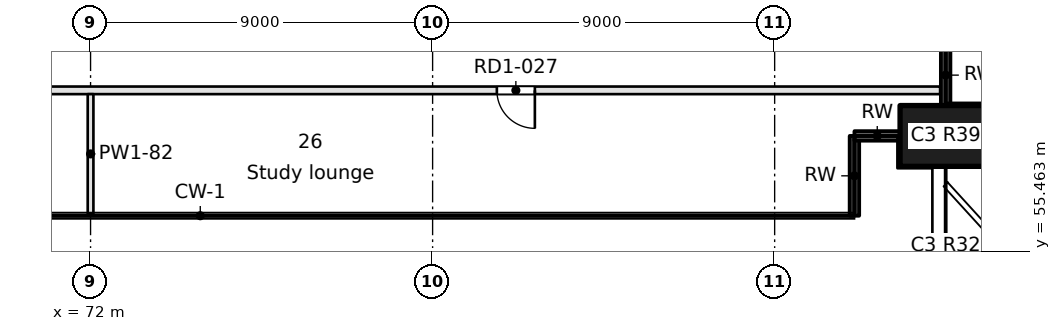
"""IFC4 building model, lengths in metres.
Left out: names, types, materials, properties, quantities, classifications, styles, units other than length and angle.
Written with IfcOpenShell. Run it as: python <this file> out.ifc"""

import sys

from ifc_helpers import new_model, si_unit, direction, frame, frame_2d, origin, origin_2d, place, context, subcontext, project, spatial, rectangle, extrude, element, fill, save


model = new_model("IFC4")
c1 = context("Model", 3, precision=1e-05, world=origin(), true_north=direction((0.0, 1.0)))
c2 = subcontext(c1, "Body", "Model", "MODEL_VIEW")
j1 = project(units=[si_unit("LENGTHUNIT", "METRE"), si_unit("PLANEANGLEUNIT", "RADIAN")], contexts=[c1])
p1 = place(None, origin())
s1 = spatial("IfcSite", under=j1, at=p1, CompositionType="ELEMENT")
p2 = place(p1, origin())
s2 = spatial("IfcBuilding", under=s1, at=p2, CompositionType="ELEMENT")
p3 = place(p2, frame((0.0, 0.0, 46.9)))
s3 = spatial("IfcBuildingStorey", under=s2, at=p3, CompositionType="ELEMENT", Elevation=46.9)
p4 = place(p3, frame((94.5, 58.5, 0.0), z_axis=(0.0, 0.0, 1.0), x_axis=(1.0, 0.0, 0.0)))
e1 = element("IfcColumn", 1, at=p4, inside=s3, PredefinedType="COLUMN", context=c2, shape_type="SweptSolid", body=[
    extrude(rectangle(XDim=2.4, YDim=1.6, at=origin_2d()), origin(), (0.0, 0.0, 1.0), 3.7),
])
p5 = place(p3, frame((92.099, 56.401, 0.0), z_axis=(0.0, 0.0, 1.0), x_axis=(0.00011626555, 0.999999993241, 0.0)))
e2 = element("IfcWall", 2, at=p5, inside=s3, PredefinedType="SOLIDWALL", context=c2, shape_type="SweptSolid", body=[
    extrude(rectangle(XDim=2.1, YDim=0.25, at=frame_2d((1.05, 0.0))), origin(), (0.0, 0.0, 1.0), 3.3),
])
p6 = place(p3, frame((92.099, 58.501, 0.0), z_axis=(0.0, 0.0, 1.0), x_axis=(1.0, 0.0, 0.0)))
e3 = element("IfcWall", 3, at=p6, inside=s3, PredefinedType="SOLIDWALL", context=c2, shape_type="SweptSolid", body=[
    extrude(rectangle(XDim=1.201, YDim=0.25, at=frame_2d((0.6, 0.0))), origin(), (0.0, 0.0, 1.0), 3.3),
])
p7 = place(p3, frame((94.499, 59.3, 0.0), z_axis=(0.0, 0.0, 1.0), x_axis=(0.00015253203, 0.999999988367, 0.0)))
e4 = element("IfcWall", 4, at=p7, inside=s3, PredefinedType="SOLIDWALL", context=c2, shape_type="SweptSolid", body=[
    extrude(rectangle(XDim=1.601, YDim=0.25, at=frame_2d((0.8, 0.0))), origin(), (0.0, 0.0, 1.0), 3.3),
])
p8 = place(p3, frame((94.354, 59.7, 0.0), z_axis=(0.0, 0.0, 1.0), x_axis=(-1.0, 0.0, 0.0)))
e5 = element("IfcWall", 5, at=p8, inside=s3, PredefinedType="PARTITIONING", context=c2, shape_type="SweptSolid", body=[
    extrude(rectangle(XDim=59.682, YDim=0.2, at=frame_2d((29.841, 0.0))), origin(), (0.0, 0.0, 1.0), 3.3),
])
p9 = place(p8, frame((51.805, 0.0, 0.0)))
e6 = element("IfcOpeningElement", 6, at=p9, cuts=e5, PredefinedType="OPENING", context=c2, shape_type="SweptSolid", body=[
    extrude(rectangle(XDim=1.0, YDim=2.1, at=frame_2d((0.5, 1.05))), frame((0.0, 0.1, 0.0), z_axis=(0.0, -1.0, 0.0), x_axis=(1.0, 0.0, 0.0)), (0.0, 0.0, 1.0), 0.2),
])
p10 = place(p8, frame((44.427, 0.0, 0.0)))
e7 = element("IfcOpeningElement", 7, at=p10, cuts=e5, PredefinedType="OPENING", context=c2, shape_type="SweptSolid", body=[
    extrude(rectangle(XDim=1.0, YDim=2.1, at=frame_2d((0.5, 1.05))), frame((0.0, 0.1, 0.0), z_axis=(0.0, -1.0, 0.0), x_axis=(1.0, 0.0, 0.0)), (0.0, 0.0, 1.0), 0.2),
])
p11 = place(p8, frame((35.423, 0.0, 0.0)))
e8 = element("IfcOpeningElement", 8, at=p11, cuts=e5, PredefinedType="OPENING", context=c2, shape_type="SweptSolid", body=[
    extrude(rectangle(XDim=1.0, YDim=2.1, at=frame_2d((0.5, 1.05))), frame((0.0, 0.1, 0.0), z_axis=(0.0, -1.0, 0.0), x_axis=(1.0, 0.0, 0.0)), (0.0, 0.0, 1.0), 0.2),
])
p12 = place(p8, frame((26.42, 0.0, 0.0)))
e9 = element("IfcOpeningElement", 9, at=p12, cuts=e5, PredefinedType="OPENING", context=c2, shape_type="SweptSolid", body=[
    extrude(rectangle(XDim=1.0, YDim=2.1, at=frame_2d((0.5, 1.05))), frame((0.0, 0.1, 0.0), z_axis=(0.0, -1.0, 0.0), x_axis=(1.0, 0.0, 0.0)), (0.0, 0.0, 1.0), 0.2),
])
p13 = place(p8, frame((10.664, 0.0, 0.0)))
e10 = element("IfcOpeningElement", 10, at=p13, cuts=e5, PredefinedType="OPENING", context=c2, shape_type="SweptSolid", body=[
    extrude(rectangle(XDim=1.0, YDim=2.1, at=frame_2d((0.5, 1.05))), frame((0.0, 0.1, 0.0), z_axis=(0.0, -1.0, 0.0), x_axis=(1.0, 0.0, 0.0)), (0.0, 0.0, 1.0), 0.2),
])
p14 = place(p3, frame((72.0, 59.6, 0.0), z_axis=(0.0, 0.0, 1.0), x_axis=(0.0, -1.0, 0.0)))
e11 = element("IfcWall", 11, at=p14, inside=s3, PredefinedType="PARTITIONING", context=c2, shape_type="SweptSolid", body=[
    extrude(rectangle(XDim=3.145, YDim=0.15, at=frame_2d((1.573, 0.0))), origin(), (0.0, 0.0, 1.0), 3.3),
])
p15 = place(p13, origin())
e12 = element("IfcDoor", 12, at=p15, inside=s3, OperationType="SINGLE_SWING_LEFT", PredefinedType="DOOR", context=c2, shape_type="SweptSolid", body=[
    extrude(rectangle(XDim=1.0, YDim=2.1, at=frame_2d((0.5, 1.05))), frame((0.0, 0.025, 0.0), z_axis=(0.0, -1.0, 0.0), x_axis=(1.0, 0.0, 0.0)), (0.0, 0.0, 1.0), 0.05),
])
fill(e10, e12)
save(model, sys.argv[1])
